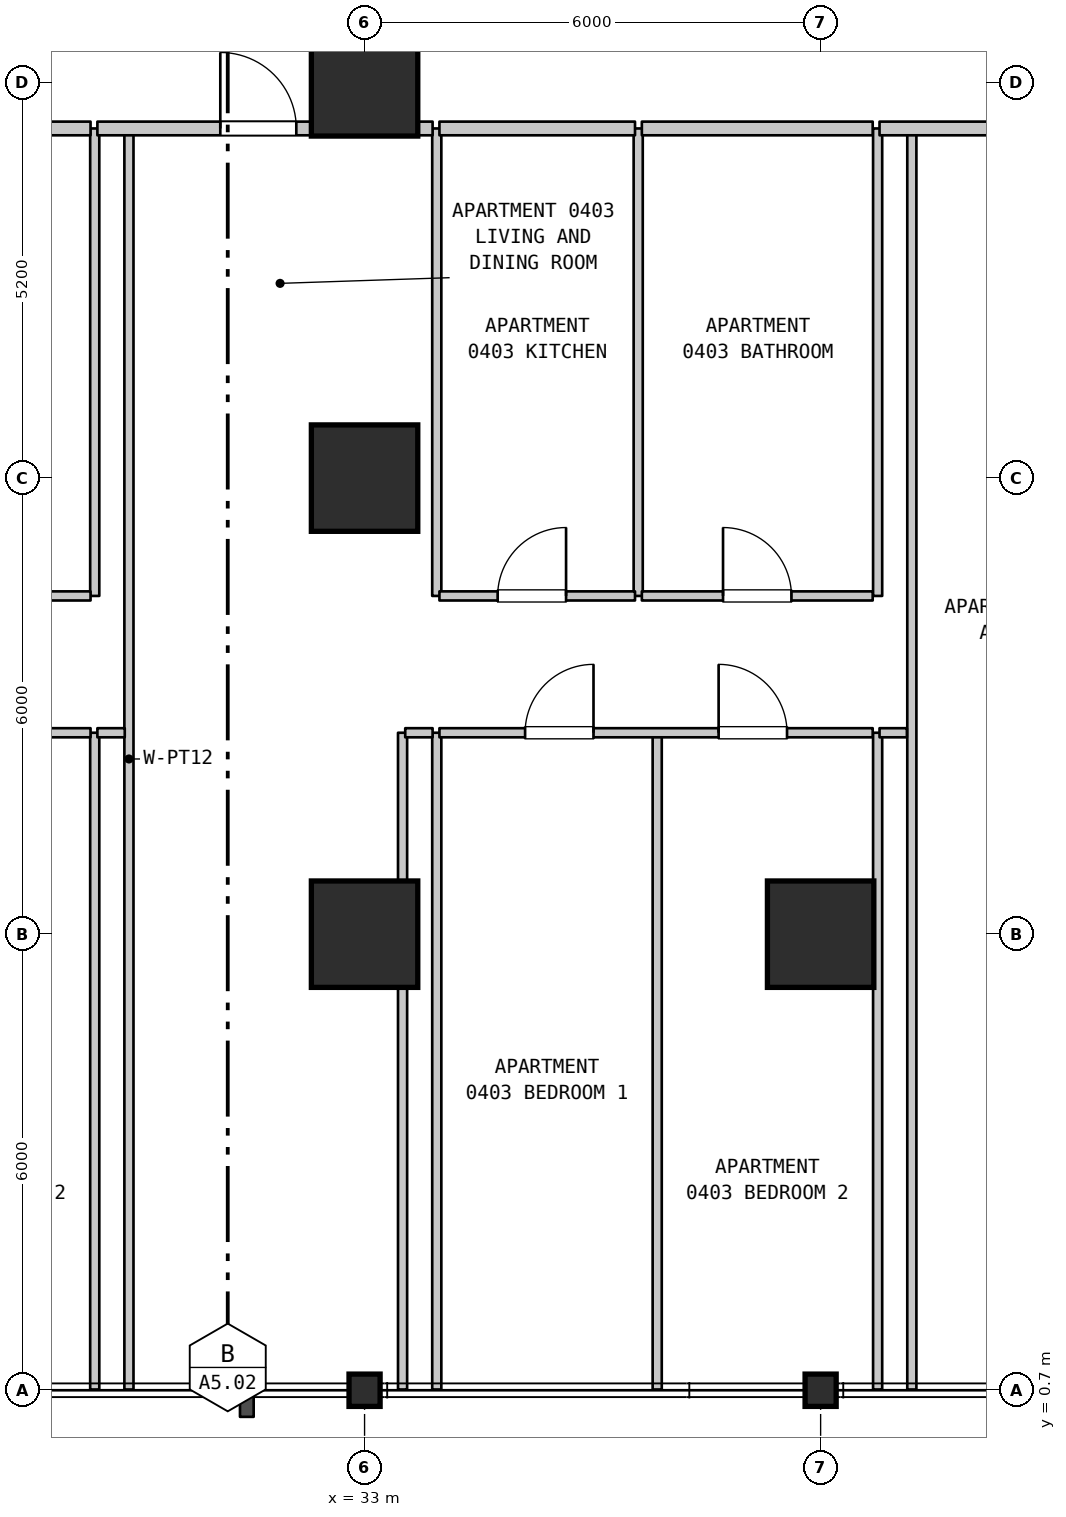
"""IFC4 building model, lengths in metres.
Left out: names, types, materials, properties, quantities, classifications, styles, units other than length and angle.
Written with IfcOpenShell. Run it as: python <this file> out.ifc"""

import sys

from ifc_helpers import new_model, si_unit, direction, frame, frame_2d, origin, origin_2d, place, context, subcontext, project, spatial, rectangle, i_section, extrude, element, fill, save


model = new_model("IFC4")
c1 = context("Model", 3, precision=1e-05, world=origin(), true_north=direction((0.0, 1.0)))
c2 = subcontext(c1, "Body", "Model", "MODEL_VIEW")
j1 = project(units=[si_unit("LENGTHUNIT", "METRE"), si_unit("PLANEANGLEUNIT", "RADIAN")], contexts=[c1])
p1 = place(None, origin())
s1 = spatial("IfcSite", under=j1, at=p1, CompositionType="ELEMENT")
p2 = place(p1, origin())
s2 = spatial("IfcBuilding", under=s1, at=p2, CompositionType="ELEMENT")
p3 = place(p2, frame((0.0, 0.0, 24.0)))
s3 = spatial("IfcBuildingStorey", under=s2, at=p3, CompositionType="ELEMENT", Elevation=24.0)
p4 = place(p3, frame((33.0, 0.7, 0.0), z_axis=(0.0, 0.0, 1.0), x_axis=(1.0, 0.0, 0.0)))
e1 = element("IfcColumn", 1, at=p4, inside=s3, PredefinedType="COLUMN", context=c2, shape_type="SweptSolid", body=[
    extrude(i_section(OverallWidth=0.409, OverallDepth=0.425, WebThickness=0.032, FlangeThickness=0.052, FilletRadius=0.015, at=origin_2d()), origin(), (0.0, 0.0, 1.0), 3.7),
])
for number, where, z_axis, x_axis in (
    (2, (33.0, 6.7, 0.0), (0.0, 0.0, 1.0), (1.0, 0.0, 0.0)),
    (3, (33.0, 12.7, 0.0), (0.0, 0.0, 1.0), (1.0, 0.0, 0.0)),
    (4, (33.0, 17.9, 0.0), (0.0, 0.0, 1.0), (1.0, 0.0, 0.0)),
):
    element("IfcColumn", number, at=place(p3, frame(where, z_axis=z_axis, x_axis=x_axis)), inside=s3, PredefinedType="COLUMN", context=c2, shape_type="SweptSolid", body=[
        extrude(rectangle(XDim=1.4, YDim=1.4, at=origin_2d()), origin(), (0.0, 0.0, 1.0), 3.7),
    ])
p5 = place(p3, frame((39.0, 0.7, 0.0), z_axis=(0.0, 0.0, 1.0), x_axis=(1.0, 0.0, 0.0)))
e5 = element("IfcColumn", 5, at=p5, inside=s3, PredefinedType="COLUMN", context=c2, shape_type="SweptSolid", body=[
    extrude(i_section(OverallWidth=0.409, OverallDepth=0.425, WebThickness=0.032, FlangeThickness=0.052, FilletRadius=0.015, at=origin_2d()), origin(), (0.0, 0.0, 1.0), 3.7),
])
p6 = place(p3, frame((39.0, 6.7, 0.0), z_axis=(0.0, 0.0, 1.0), x_axis=(1.0, 0.0, 0.0)))
e6 = element("IfcColumn", 6, at=p6, inside=s3, PredefinedType="COLUMN", context=c2, shape_type="SweptSolid", body=[
    extrude(rectangle(XDim=1.4, YDim=1.4, at=origin_2d()), origin(), (0.0, 0.0, 1.0), 3.7),
])
p7 = place(p3, frame((29.45, 0.71, 0.0), z_axis=(0.0, 0.0, 1.0), x_axis=(0.0, 1.0, 0.0)))
e7 = element("IfcWall", 7, at=p7, inside=s3, PredefinedType="PARTITIONING", context=c2, shape_type="SweptSolid", body=[
    extrude(rectangle(XDim=8.64, YDim=0.12, at=frame_2d((4.32, 0.0))), origin(), (0.0, 0.0, 1.0), 3.385),
])
p8 = place(p3, frame((29.45, 11.15, 0.0), z_axis=(0.0, 0.0, 1.0), x_axis=(0.0, 1.0, 0.0)))
e8 = element("IfcWall", 8, at=p8, inside=s3, PredefinedType="PARTITIONING", context=c2, shape_type="SweptSolid", body=[
    extrude(rectangle(XDim=6.15, YDim=0.12, at=frame_2d((3.075, 0.0))), origin(), (0.0, 0.0, 1.0), 3.385),
])
p9 = place(p3, frame((29.9, 0.71, 0.0), z_axis=(0.0, 0.0, 1.0), x_axis=(0.0, 1.0, 0.0)))
e9 = element("IfcWall", 9, at=p9, inside=s3, PredefinedType="PARTITIONING", context=c2, shape_type="SweptSolid", body=[
    extrude(rectangle(XDim=16.59, YDim=0.12, at=frame_2d((8.295, 0.0))), origin(), (0.0, 0.0, 1.0), 3.385),
])
for number, where, z_axis, x_axis in (
    (10, (33.5, 0.71, 0.0), (0.0, 0.0, 1.0), (0.0, 1.0, 0.0)),
    (11, (33.95, 0.71, 0.0), (0.0, 0.0, 1.0), (0.0, 1.0, 0.0)),
):
    element("IfcWall", number, at=place(p3, frame(where, z_axis=z_axis, x_axis=x_axis)), inside=s3, PredefinedType="PARTITIONING", context=c2, shape_type="SweptSolid", body=[
        extrude(rectangle(XDim=8.64, YDim=0.12, at=frame_2d((4.32, 0.0))), origin(), (0.0, 0.0, 1.0), 3.385),
    ])
for number, where, z_axis, x_axis in (
    (12, (33.95, 11.15, 0.0), (0.0, 0.0, 1.0), (0.0, 1.0, 0.0)),
    (13, (36.6, 11.15, 0.0), (0.0, 0.0, 1.0), (0.0, 1.0, 0.0)),
):
    element("IfcWall", number, at=place(p3, frame(where, z_axis=z_axis, x_axis=x_axis)), inside=s3, PredefinedType="PARTITIONING", context=c2, shape_type="SweptSolid", body=[
        extrude(rectangle(XDim=6.15, YDim=0.12, at=frame_2d((3.075, 0.0))), origin(), (0.0, 0.0, 1.0), 3.385),
    ])
for number, where, z_axis, x_axis in (
    (14, (36.85, 0.71, 0.0), (0.0, 0.0, 1.0), (0.0, 1.0, 0.0)),
    (15, (39.75, 0.71, 0.0), (0.0, 0.0, 1.0), (0.0, 1.0, 0.0)),
):
    element("IfcWall", number, at=place(p3, frame(where, z_axis=z_axis, x_axis=x_axis)), inside=s3, PredefinedType="PARTITIONING", context=c2, shape_type="SweptSolid", body=[
        extrude(rectangle(XDim=8.64, YDim=0.12, at=frame_2d((4.32, 0.0))), origin(), (0.0, 0.0, 1.0), 3.385),
    ])
p10 = place(p3, frame((39.75, 11.15, 0.0), z_axis=(0.0, 0.0, 1.0), x_axis=(0.0, 1.0, 0.0)))
e16 = element("IfcWall", 16, at=p10, inside=s3, PredefinedType="PARTITIONING", context=c2, shape_type="SweptSolid", body=[
    extrude(rectangle(XDim=6.15, YDim=0.12, at=frame_2d((3.075, 0.0))), origin(), (0.0, 0.0, 1.0), 3.385),
])
p11 = place(p3, frame((40.2, 0.71, 0.0), z_axis=(0.0, 0.0, 1.0), x_axis=(0.0, 1.0, 0.0)))
e17 = element("IfcWall", 17, at=p11, inside=s3, PredefinedType="PARTITIONING", context=c2, shape_type="SweptSolid", body=[
    extrude(rectangle(XDim=16.59, YDim=0.12, at=frame_2d((8.295, 0.0))), origin(), (0.0, 0.0, 1.0), 3.385),
])
p12 = place(p3, frame((23.665, 9.35, 0.0), z_axis=(0.0, 0.0, 1.0), x_axis=(1.0, 0.0, 0.0)))
e18 = element("IfcWall", 18, at=p12, inside=s3, PredefinedType="PARTITIONING", context=c2, shape_type="SweptSolid", body=[
    extrude(rectangle(XDim=5.73, YDim=0.12, at=frame_2d((2.865, 0.0))), origin(), (0.0, 0.0, 1.0), 3.385),
])
p13 = place(p12, frame((1.135, 0.0, 0.0)))
e19 = element("IfcOpeningElement", 19, at=p13, cuts=e18, PredefinedType="OPENING", context=c2, shape_type="SweptSolid", body=[
    extrude(rectangle(XDim=0.9, YDim=2.15, at=frame_2d((0.45, 1.075))), frame((0.0, 0.07, 0.0), z_axis=(0.0, -1.0, 0.0), x_axis=(1.0, 0.0, 0.0)), (0.0, 0.0, 1.0), 0.14),
])
p14 = place(p12, frame((3.695, 0.0, 0.0)))
e20 = element("IfcOpeningElement", 20, at=p14, cuts=e18, PredefinedType="OPENING", context=c2, shape_type="SweptSolid", body=[
    extrude(rectangle(XDim=0.9, YDim=2.15, at=frame_2d((0.45, 1.075))), frame((0.0, 0.07, 0.0), z_axis=(0.0, -1.0, 0.0), x_axis=(1.0, 0.0, 0.0)), (0.0, 0.0, 1.0), 0.14),
])
p15 = place(p3, frame((29.485, 9.35, 0.0), z_axis=(0.0, 0.0, 1.0), x_axis=(1.0, 0.0, 0.0)))
e21 = element("IfcWall", 21, at=p15, inside=s3, PredefinedType="PARTITIONING", context=c2, shape_type="SweptSolid", body=[
    extrude(rectangle(XDim=0.36, YDim=0.12, at=frame_2d((0.18, 0.0))), origin(), (0.0, 0.0, 1.0), 3.385),
])
p16 = place(p3, frame((33.535, 9.35, 0.0), z_axis=(0.0, 0.0, 1.0), x_axis=(1.0, 0.0, 0.0)))
e22 = element("IfcWall", 22, at=p16, inside=s3, PredefinedType="PARTITIONING", context=c2, shape_type="SweptSolid", body=[
    extrude(rectangle(XDim=0.36, YDim=0.12, at=frame_2d((0.18, 0.0))), origin(), (0.0, 0.0, 1.0), 3.385),
])
p17 = place(p3, frame((33.985, 9.35, 0.0), z_axis=(0.0, 0.0, 1.0), x_axis=(1.0, 0.0, 0.0)))
e23 = element("IfcWall", 23, at=p17, inside=s3, PredefinedType="PARTITIONING", context=c2, shape_type="SweptSolid", body=[
    extrude(rectangle(XDim=5.7, YDim=0.12, at=frame_2d((2.85, 0.0))), origin(), (0.0, 0.0, 1.0), 3.385),
])
p18 = place(p17, frame((1.127, 0.0, 0.0)))
e24 = element("IfcOpeningElement", 24, at=p18, cuts=e23, PredefinedType="OPENING", context=c2, shape_type="SweptSolid", body=[
    extrude(rectangle(XDim=0.9, YDim=2.15, at=frame_2d((0.45, 1.075))), frame((0.0, 0.07, 0.0), z_axis=(0.0, -1.0, 0.0), x_axis=(1.0, 0.0, 0.0)), (0.0, 0.0, 1.0), 0.14),
])
p19 = place(p17, frame((3.673, 0.0, 0.0)))
e25 = element("IfcOpeningElement", 25, at=p19, cuts=e23, PredefinedType="OPENING", context=c2, shape_type="SweptSolid", body=[
    extrude(rectangle(XDim=0.9, YDim=2.15, at=frame_2d((0.45, 1.075))), frame((0.0, 0.07, 0.0), z_axis=(0.0, -1.0, 0.0), x_axis=(1.0, 0.0, 0.0)), (0.0, 0.0, 1.0), 0.14),
])
p20 = place(p3, frame((39.775, 9.35, 0.0), z_axis=(0.0, 0.0, 1.0), x_axis=(1.0, 0.0, 0.0)))
e26 = element("IfcWall", 26, at=p20, inside=s3, PredefinedType="PARTITIONING", context=c2, shape_type="SweptSolid", body=[
    extrude(rectangle(XDim=0.36, YDim=0.12, at=frame_2d((0.18, 0.0))), origin(), (0.0, 0.0, 1.0), 3.385),
])
p21 = place(p3, frame((26.342, 11.15, 0.0), z_axis=(0.0, 0.0, 1.0), x_axis=(1.0, 0.0, 0.0)))
e27 = element("IfcWall", 27, at=p21, inside=s3, PredefinedType="PARTITIONING", context=c2, shape_type="SweptSolid", body=[
    extrude(rectangle(XDim=3.053, YDim=0.12, at=frame_2d((1.526, 0.0))), origin(), (0.0, 0.0, 1.0), 3.385),
])
p22 = place(p21, frame((1.077, 0.0, 0.0)))
e28 = element("IfcOpeningElement", 28, at=p22, cuts=e27, PredefinedType="OPENING", context=c2, shape_type="SweptSolid", body=[
    extrude(rectangle(XDim=0.9, YDim=2.1, at=frame_2d((0.45, 1.05))), frame((0.0, 0.07, 0.0), z_axis=(0.0, -1.0, 0.0), x_axis=(1.0, 0.0, 0.0)), (0.0, 0.0, 1.0), 0.14),
])
p23 = place(p3, frame((33.985, 11.15, 0.0), z_axis=(0.0, 0.0, 1.0), x_axis=(1.0, 0.0, 0.0)))
e29 = element("IfcWall", 29, at=p23, inside=s3, PredefinedType="PARTITIONING", context=c2, shape_type="SweptSolid", body=[
    extrude(rectangle(XDim=2.573, YDim=0.12, at=frame_2d((1.287, 0.0))), origin(), (0.0, 0.0, 1.0), 3.385),
])
p24 = place(p23, frame((0.766, 0.0, 0.0)))
e30 = element("IfcOpeningElement", 30, at=p24, cuts=e29, PredefinedType="OPENING", context=c2, shape_type="SweptSolid", body=[
    extrude(rectangle(XDim=0.9, YDim=2.15, at=frame_2d((0.45, 1.075))), frame((0.0, 0.07, 0.0), z_axis=(0.0, -1.0, 0.0), x_axis=(1.0, 0.0, 0.0)), (0.0, 0.0, 1.0), 0.14),
])
p25 = place(p3, frame((36.648, 11.15, 0.0), z_axis=(0.0, 0.0, 1.0), x_axis=(1.0, 0.0, 0.0)))
e31 = element("IfcWall", 31, at=p25, inside=s3, PredefinedType="PARTITIONING", context=c2, shape_type="SweptSolid", body=[
    extrude(rectangle(XDim=3.037, YDim=0.12, at=frame_2d((1.519, 0.0))), origin(), (0.0, 0.0, 1.0), 3.385),
])
p26 = place(p25, frame((1.068, 0.0, 0.0)))
e32 = element("IfcOpeningElement", 32, at=p26, cuts=e31, PredefinedType="OPENING", context=c2, shape_type="SweptSolid", body=[
    extrude(rectangle(XDim=0.9, YDim=2.1, at=frame_2d((0.45, 1.05))), frame((0.0, 0.07, 0.0), z_axis=(0.0, -1.0, 0.0), x_axis=(1.0, 0.0, 0.0)), (0.0, 0.0, 1.0), 0.14),
])
p27 = place(p3, frame((26.342, 17.3, 0.0), z_axis=(0.0, 0.0, 1.0), x_axis=(1.0, 0.0, 0.0)))
e33 = element("IfcWall", 33, at=p27, inside=s3, PredefinedType="STANDARD", context=c2, shape_type="SweptSolid", body=[
    extrude(rectangle(XDim=3.053, YDim=0.18, at=frame_2d((1.526, 0.0))), origin(), (0.0, 0.0, 1.0), 3.385),
])
p28 = place(p3, frame((29.485, 17.3, 0.0), z_axis=(0.0, 0.0, 1.0), x_axis=(1.0, 0.0, 0.0)))
e34 = element("IfcWall", 34, at=p28, inside=s3, PredefinedType="STANDARD", context=c2, shape_type="SweptSolid", body=[
    extrude(rectangle(XDim=4.41, YDim=0.18, at=frame_2d((2.205, 0.0))), origin(), (0.0, 0.0, 1.0), 3.385),
])
p29 = place(p28, frame((1.617, 0.0, 0.0)))
e35 = element("IfcOpeningElement", 35, at=p29, cuts=e34, PredefinedType="OPENING", context=c2, shape_type="SweptSolid", body=[
    extrude(rectangle(XDim=1.0, YDim=2.15, at=frame_2d((0.5, 1.075))), frame((0.0, 0.1, 0.0), z_axis=(0.0, -1.0, 0.0), x_axis=(1.0, 0.0, 0.0)), (0.0, 0.0, 1.0), 0.2),
])
p30 = place(p3, frame((33.985, 17.3, 0.0), z_axis=(0.0, 0.0, 1.0), x_axis=(1.0, 0.0, 0.0)))
e36 = element("IfcWall", 36, at=p30, inside=s3, PredefinedType="STANDARD", context=c2, shape_type="SweptSolid", body=[
    extrude(rectangle(XDim=2.573, YDim=0.18, at=frame_2d((1.287, 0.0))), origin(), (0.0, 0.0, 1.0), 3.385),
])
p31 = place(p3, frame((36.648, 17.3, 0.0), z_axis=(0.0, 0.0, 1.0), x_axis=(1.0, 0.0, 0.0)))
e37 = element("IfcWall", 37, at=p31, inside=s3, PredefinedType="STANDARD", context=c2, shape_type="SweptSolid", body=[
    extrude(rectangle(XDim=3.037, YDim=0.18, at=frame_2d((1.519, 0.0))), origin(), (0.0, 0.0, 1.0), 3.385),
])
p32 = place(p3, frame((39.775, 17.3, 0.0), z_axis=(0.0, 0.0, 1.0), x_axis=(1.0, 0.0, 0.0)))
e38 = element("IfcWall", 38, at=p32, inside=s3, PredefinedType="STANDARD", context=c2, shape_type="SweptSolid", body=[
    extrude(rectangle(XDim=4.41, YDim=0.18, at=frame_2d((2.205, 0.0))), origin(), (0.0, 0.0, 1.0), 3.385),
])
p33 = place(p32, frame((1.905, 0.0, 0.0)))
e39 = element("IfcOpeningElement", 39, at=p33, cuts=e38, PredefinedType="OPENING", context=c2, shape_type="SweptSolid", body=[
    extrude(rectangle(XDim=1.0, YDim=2.15, at=frame_2d((0.5, 1.075))), frame((0.0, 0.1, 0.0), z_axis=(0.0, -1.0, 0.0), x_axis=(1.0, 0.0, 0.0)), (0.0, 0.0, 1.0), 0.2),
])
p34 = place(p18, origin())
e40 = element("IfcDoor", 40, at=p34, inside=s3, OperationType="SINGLE_SWING_RIGHT", PredefinedType="DOOR", context=c2, shape_type="SweptSolid", body=[
    extrude(rectangle(XDim=0.9, YDim=2.15, at=frame_2d((0.45, 1.075))), frame((0.0, 0.025, 0.0), z_axis=(0.0, -1.0, 0.0), x_axis=(1.0, 0.0, 0.0)), (0.0, 0.0, 1.0), 0.05),
])
fill(e24, e40)
p35 = place(p19, origin())
e41 = element("IfcDoor", 41, at=p35, inside=s3, OperationType="SINGLE_SWING_LEFT", PredefinedType="DOOR", context=c2, shape_type="SweptSolid", body=[
    extrude(rectangle(XDim=0.9, YDim=2.15, at=frame_2d((0.45, 1.075))), frame((0.0, 0.025, 0.0), z_axis=(0.0, -1.0, 0.0), x_axis=(1.0, 0.0, 0.0)), (0.0, 0.0, 1.0), 0.05),
])
fill(e25, e41)
p36 = place(p24, origin())
e42 = element("IfcDoor", 42, at=p36, inside=s3, OperationType="SINGLE_SWING_RIGHT", PredefinedType="DOOR", context=c2, shape_type="SweptSolid", body=[
    extrude(rectangle(XDim=0.9, YDim=2.15, at=frame_2d((0.45, 1.075))), frame((0.0, 0.025, 0.0), z_axis=(0.0, -1.0, 0.0), x_axis=(1.0, 0.0, 0.0)), (0.0, 0.0, 1.0), 0.05),
])
fill(e30, e42)
p37 = place(p26, origin())
e43 = element("IfcDoor", 43, at=p37, inside=s3, OperationType="SINGLE_SWING_LEFT", PredefinedType="DOOR", context=c2, shape_type="SweptSolid", body=[
    extrude(rectangle(XDim=0.9, YDim=2.1, at=frame_2d((0.45, 1.05))), frame((0.0, 0.025, 0.0), z_axis=(0.0, -1.0, 0.0), x_axis=(1.0, 0.0, 0.0)), (0.0, 0.0, 1.0), 0.05),
])
fill(e32, e43)
p38 = place(p29, origin())
e44 = element("IfcDoor", 44, at=p38, inside=s3, OperationType="SINGLE_SWING_LEFT", PredefinedType="DOOR", context=c2, shape_type="SweptSolid", body=[
    extrude(rectangle(XDim=1.0, YDim=2.15, at=frame_2d((0.5, 1.075))), frame((0.0, 0.025, 0.0), z_axis=(0.0, -1.0, 0.0), x_axis=(1.0, 0.0, 0.0)), (0.0, 0.0, 1.0), 0.05),
])
fill(e35, e44)
save(model, sys.argv[1])
